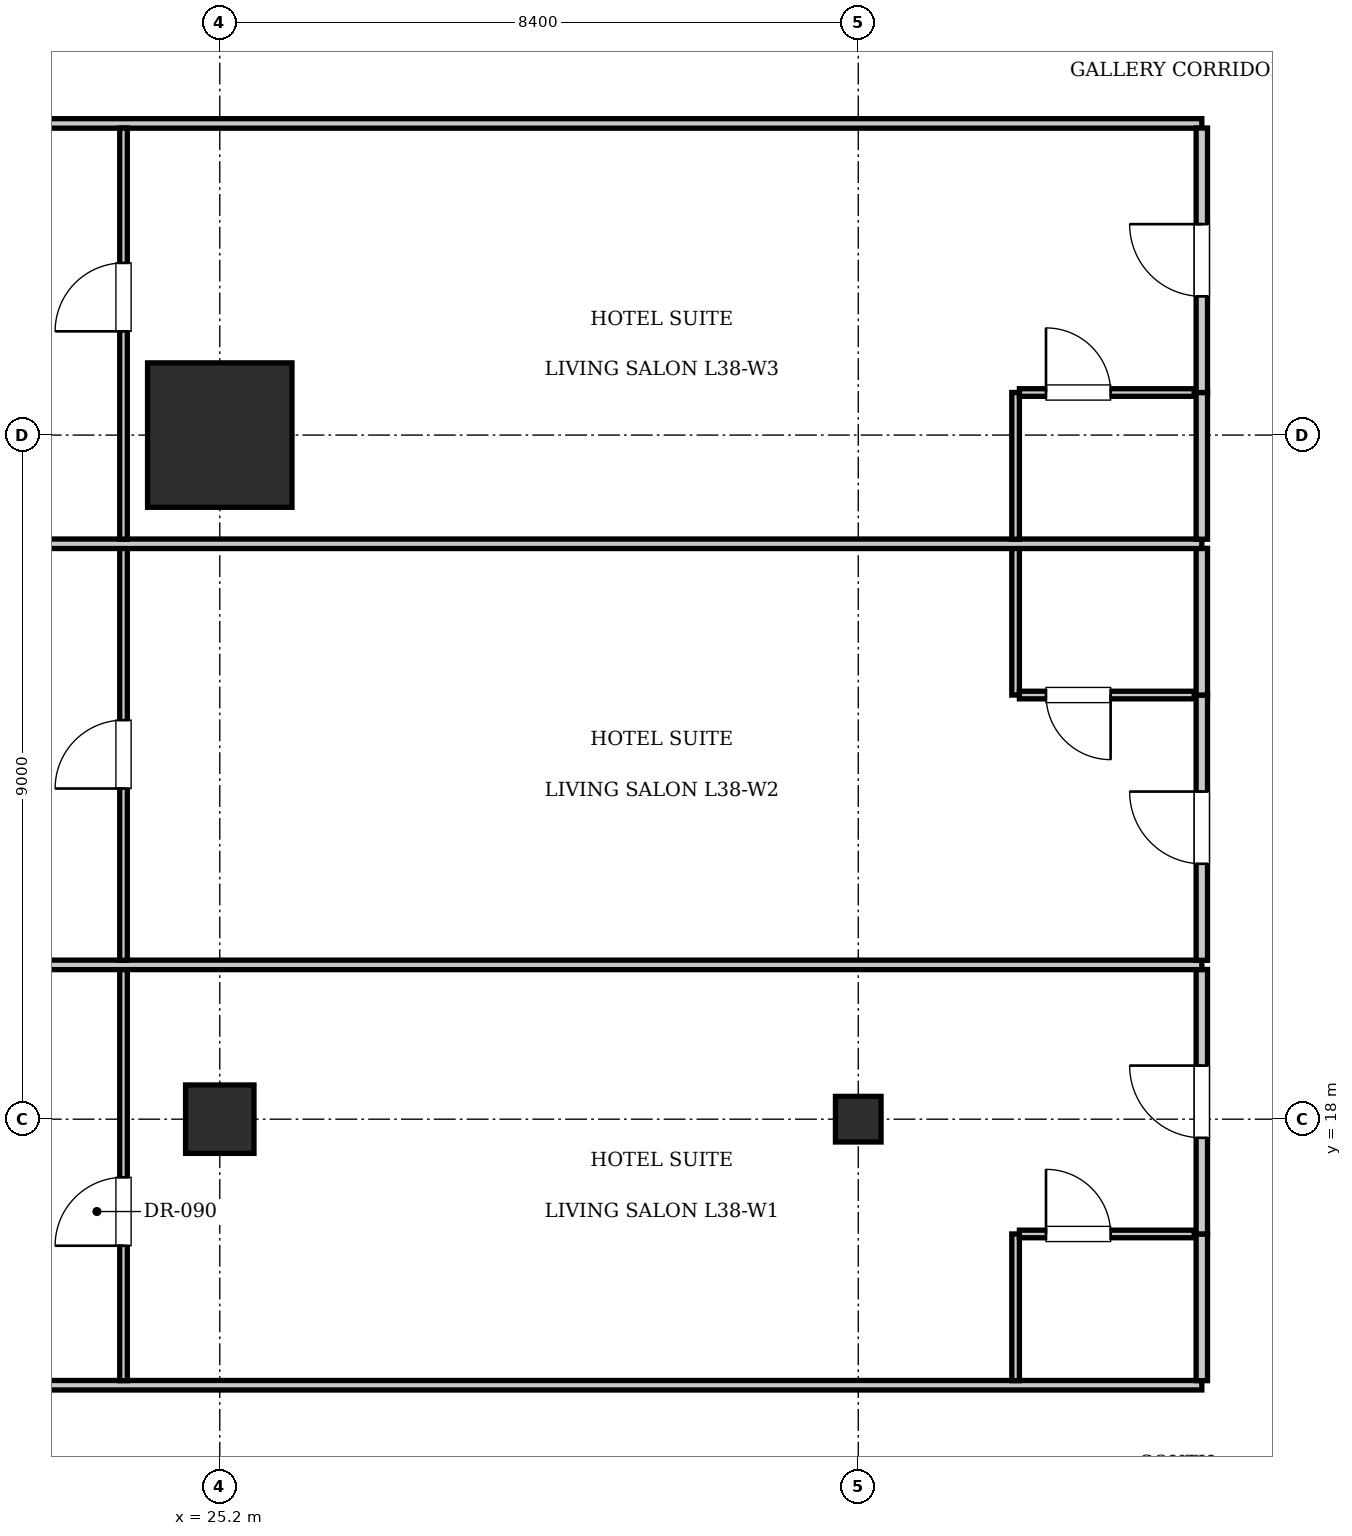
"""IFC4 building model, lengths in metres.
Left out: names, types, materials, properties, quantities, classifications, styles, units other than length and angle.
Written with IfcOpenShell. Run it as: python <this file> out.ifc"""

import sys

from ifc_helpers import new_model, si_unit, direction, frame, frame_2d, origin, origin_2d, place, context, subcontext, project, spatial, rectangle, i_section, extrude, element, fill, save


model = new_model("IFC4")
c1 = context("Model", 3, precision=1e-05, world=origin(), true_north=direction((0.0, 1.0)))
c2 = subcontext(c1, "Body", "Model", "MODEL_VIEW")
j1 = project(units=[si_unit("LENGTHUNIT", "METRE"), si_unit("PLANEANGLEUNIT", "RADIAN")], contexts=[c1])
p1 = place(None, origin())
s1 = spatial("IfcSite", under=j1, at=p1, CompositionType="ELEMENT")
p2 = place(p1, origin())
s2 = spatial("IfcBuilding", under=s1, at=p2, CompositionType="ELEMENT")
p3 = place(p2, frame((0.0, 0.0, 158.2)))
s3 = spatial("IfcBuildingStorey", under=s2, at=p3, CompositionType="ELEMENT", Elevation=158.2)
p4 = place(p3, frame((25.2, 27.0, 0.0), z_axis=(0.0, 0.0, 1.0), x_axis=(1.0, 0.0, 0.0)))
e1 = element("IfcColumn", 1, at=p4, inside=s3, PredefinedType="COLUMN", context=c2, shape_type="SweptSolid", body=[
    extrude(rectangle(XDim=1.9, YDim=1.9, at=origin_2d()), origin(), (0.0, 0.0, 1.0), 3.85),
])
p5 = place(p3, frame((25.2, 18.0, 0.0), z_axis=(0.0, 0.0, 1.0), x_axis=(1.0, 0.0, 0.0)))
e2 = element("IfcColumn", 2, at=p5, inside=s3, PredefinedType="COLUMN", context=c2, shape_type="SweptSolid", body=[
    extrude(rectangle(XDim=0.9, YDim=0.9, at=origin_2d()), origin(), (0.0, 0.0, 1.0), 3.85),
])
p6 = place(p3, frame((33.6, 18.0, 0.0), z_axis=(0.0, 0.0, 1.0), x_axis=(1.0, 0.0, 0.0)))
e3 = element("IfcColumn", 3, at=p6, inside=s3, PredefinedType="COLUMN", context=c2, shape_type="SweptSolid", body=[
    extrude(i_section(OverallWidth=0.6, OverallDepth=0.6, WebThickness=0.025, FlangeThickness=0.038, at=origin_2d()), origin(), (0.0, 0.0, 1.0), 3.85),
])
for number, where, z_axis, x_axis in (
    (4, (13.2, 14.5, 0.0), (0.0, 0.0, 1.0), (1.0, 0.0, 0.0)),
    (5, (13.2, 31.1, 0.0), (0.0, 0.0, 1.0), (1.0, 0.0, 0.0)),
):
    element("IfcWall", number, at=place(p3, frame(where, z_axis=z_axis, x_axis=x_axis)), inside=s3, PredefinedType="PARTITIONING", context=c2, shape_type="SweptSolid", body=[
        extrude(rectangle(XDim=24.92, YDim=0.125, at=frame_2d((12.46, 0.0))), origin(), (0.0, 0.0, 1.0), 3.61),
    ])
p7 = place(p3, frame((38.12, 14.56, 0.0), z_axis=(0.0, 0.0, 1.0), x_axis=(0.0, 1.0, 0.0)))
e6 = element("IfcWall", 6, at=p7, inside=s3, PredefinedType="PARTITIONING", context=c2, shape_type="SweptSolid", body=[
    extrude(rectangle(XDim=1.93, YDim=0.15, at=frame_2d((0.965, 0.0))), origin(), (0.0, 0.0, 1.0), 3.61),
])
p8 = place(p3, frame((38.12, 16.49, 0.0), z_axis=(0.0, 0.0, 1.0), x_axis=(0.0, 1.0, 0.0)))
e7 = element("IfcWall", 7, at=p8, inside=s3, PredefinedType="PARTITIONING", context=c2, shape_type="SweptSolid", body=[
    extrude(rectangle(XDim=3.48, YDim=0.15, at=frame_2d((1.74, 0.0))), origin(), (0.0, 0.0, 1.0), 3.61),
])
p9 = place(p8, frame((1.265, 0.0, 0.0)))
e8 = element("IfcOpeningElement", 8, at=p9, cuts=e7, PredefinedType="OPENING", context=c2, shape_type="SweptSolid", body=[
    extrude(rectangle(XDim=0.95, YDim=2.15, at=frame_2d((0.475, 1.075))), frame((0.0, 0.085, 0.0), z_axis=(0.0, -1.0, 0.0), x_axis=(1.0, 0.0, 0.0)), (0.0, 0.0, 1.0), 0.17),
])
p10 = place(p3, frame((35.67, 14.56, 0.0), z_axis=(0.0, 0.0, 1.0), x_axis=(0.0, 1.0, 0.0)))
e9 = element("IfcWall", 9, at=p10, inside=s3, PredefinedType="PARTITIONING", context=c2, shape_type="SweptSolid", body=[
    extrude(rectangle(XDim=1.93, YDim=0.1, at=frame_2d((0.965, 0.0))), origin(), (0.0, 0.0, 1.0), 3.61),
])
p11 = place(p3, frame((35.72, 16.49, 0.0), z_axis=(0.0, 0.0, 1.0), x_axis=(1.0, 0.0, 0.0)))
e10 = element("IfcWall", 10, at=p11, inside=s3, PredefinedType="PARTITIONING", context=c2, shape_type="SweptSolid", body=[
    extrude(rectangle(XDim=2.3, YDim=0.1, at=frame_2d((1.15, 0.0))), origin(), (0.0, 0.0, 1.0), 3.61),
])
p12 = place(p11, frame((0.35, 0.0, 0.0)))
e11 = element("IfcOpeningElement", 11, at=p12, cuts=e10, PredefinedType="OPENING", context=c2, shape_type="SweptSolid", body=[
    extrude(rectangle(XDim=0.85, YDim=2.1, at=frame_2d((0.425, 1.05))), frame((0.0, 0.06, 0.0), z_axis=(0.0, -1.0, 0.0), x_axis=(1.0, 0.0, 0.0)), (0.0, 0.0, 1.0), 0.12),
])
p13 = place(p3, frame((23.934, 14.56, 0.0), z_axis=(0.0, 0.0, 1.0), x_axis=(0.0, 1.0, 0.0)))
e12 = element("IfcWall", 12, at=p13, inside=s3, PredefinedType="PARTITIONING", context=c2, shape_type="SweptSolid", body=[
    extrude(rectangle(XDim=5.41, YDim=0.1, at=frame_2d((2.705, 0.0))), origin(), (0.0, 0.0, 1.0), 3.61),
])
p14 = place(p13, frame((1.775, 0.0, 0.0)))
e13 = element("IfcOpeningElement", 13, at=p14, cuts=e12, PredefinedType="OPENING", context=c2, shape_type="SweptSolid", body=[
    extrude(rectangle(XDim=0.9, YDim=2.1, at=frame_2d((0.45, 1.05))), frame((0.0, 0.06, 0.0), z_axis=(0.0, -1.0, 0.0), x_axis=(1.0, 0.0, 0.0)), (0.0, 0.0, 1.0), 0.12),
])
p15 = place(p3, frame((13.2, 20.03, 0.0), z_axis=(0.0, 0.0, 1.0), x_axis=(1.0, 0.0, 0.0)))
e14 = element("IfcWall", 14, at=p15, inside=s3, PredefinedType="PARTITIONING", context=c2, shape_type="SweptSolid", body=[
    extrude(rectangle(XDim=24.92, YDim=0.125, at=frame_2d((12.46, 0.0))), origin(), (0.0, 0.0, 1.0), 3.61),
])
p16 = place(p3, frame((38.12, 20.09, 0.0), z_axis=(0.0, 0.0, 1.0), x_axis=(0.0, 1.0, 0.0)))
e15 = element("IfcWall", 15, at=p16, inside=s3, PredefinedType="PARTITIONING", context=c2, shape_type="SweptSolid", body=[
    extrude(rectangle(XDim=3.49, YDim=0.15, at=frame_2d((1.745, 0.0))), origin(), (0.0, 0.0, 1.0), 3.61),
])
p17 = place(p16, frame((1.27, 0.0, 0.0)))
e16 = element("IfcOpeningElement", 16, at=p17, cuts=e15, PredefinedType="OPENING", context=c2, shape_type="SweptSolid", body=[
    extrude(rectangle(XDim=0.95, YDim=2.15, at=frame_2d((0.475, 1.075))), frame((0.0, 0.085, 0.0), z_axis=(0.0, -1.0, 0.0), x_axis=(1.0, 0.0, 0.0)), (0.0, 0.0, 1.0), 0.17),
])
p18 = place(p3, frame((38.12, 23.58, 0.0), z_axis=(0.0, 0.0, 1.0), x_axis=(0.0, 1.0, 0.0)))
e17 = element("IfcWall", 17, at=p18, inside=s3, PredefinedType="PARTITIONING", context=c2, shape_type="SweptSolid", body=[
    extrude(rectangle(XDim=1.93, YDim=0.15, at=frame_2d((0.965, 0.0))), origin(), (0.0, 0.0, 1.0), 3.61),
])
p19 = place(p3, frame((35.67, 23.58, 0.0), z_axis=(0.0, 0.0, 1.0), x_axis=(0.0, 1.0, 0.0)))
e18 = element("IfcWall", 18, at=p19, inside=s3, PredefinedType="PARTITIONING", context=c2, shape_type="SweptSolid", body=[
    extrude(rectangle(XDim=1.93, YDim=0.1, at=frame_2d((0.965, 0.0))), origin(), (0.0, 0.0, 1.0), 3.61),
])
p20 = place(p3, frame((35.72, 23.58, 0.0), z_axis=(0.0, 0.0, 1.0), x_axis=(1.0, 0.0, 0.0)))
e19 = element("IfcWall", 19, at=p20, inside=s3, PredefinedType="PARTITIONING", context=c2, shape_type="SweptSolid", body=[
    extrude(rectangle(XDim=2.3, YDim=0.1, at=frame_2d((1.15, 0.0))), origin(), (0.0, 0.0, 1.0), 3.61),
])
p21 = place(p20, frame((0.35, 0.0, 0.0)))
e20 = element("IfcOpeningElement", 20, at=p21, cuts=e19, PredefinedType="OPENING", context=c2, shape_type="SweptSolid", body=[
    extrude(rectangle(XDim=0.85, YDim=2.1, at=frame_2d((0.425, 1.05))), frame((0.0, 0.06, 0.0), z_axis=(0.0, -1.0, 0.0), x_axis=(1.0, 0.0, 0.0)), (0.0, 0.0, 1.0), 0.12),
])
p22 = place(p3, frame((23.934, 20.09, 0.0), z_axis=(0.0, 0.0, 1.0), x_axis=(0.0, 1.0, 0.0)))
e21 = element("IfcWall", 21, at=p22, inside=s3, PredefinedType="PARTITIONING", context=c2, shape_type="SweptSolid", body=[
    extrude(rectangle(XDim=5.42, YDim=0.1, at=frame_2d((2.71, 0.0))), origin(), (0.0, 0.0, 1.0), 3.61),
])
p23 = place(p22, frame((2.26, 0.0, 0.0)))
e22 = element("IfcOpeningElement", 22, at=p23, cuts=e21, PredefinedType="OPENING", context=c2, shape_type="SweptSolid", body=[
    extrude(rectangle(XDim=0.9, YDim=2.1, at=frame_2d((0.45, 1.05))), frame((0.0, 0.06, 0.0), z_axis=(0.0, -1.0, 0.0), x_axis=(1.0, 0.0, 0.0)), (0.0, 0.0, 1.0), 0.12),
])
p24 = place(p3, frame((13.2, 25.57, 0.0), z_axis=(0.0, 0.0, 1.0), x_axis=(1.0, 0.0, 0.0)))
e23 = element("IfcWall", 23, at=p24, inside=s3, PredefinedType="PARTITIONING", context=c2, shape_type="SweptSolid", body=[
    extrude(rectangle(XDim=24.92, YDim=0.125, at=frame_2d((12.46, 0.0))), origin(), (0.0, 0.0, 1.0), 3.61),
])
p25 = place(p3, frame((38.12, 25.63, 0.0), z_axis=(0.0, 0.0, 1.0), x_axis=(0.0, 1.0, 0.0)))
e24 = element("IfcWall", 24, at=p25, inside=s3, PredefinedType="PARTITIONING", context=c2, shape_type="SweptSolid", body=[
    extrude(rectangle(XDim=1.93, YDim=0.15, at=frame_2d((0.965, 0.0))), origin(), (0.0, 0.0, 1.0), 3.61),
])
p26 = place(p3, frame((38.12, 27.56, 0.0), z_axis=(0.0, 0.0, 1.0), x_axis=(0.0, 1.0, 0.0)))
e25 = element("IfcWall", 25, at=p26, inside=s3, PredefinedType="PARTITIONING", context=c2, shape_type="SweptSolid", body=[
    extrude(rectangle(XDim=3.48, YDim=0.15, at=frame_2d((1.74, 0.0))), origin(), (0.0, 0.0, 1.0), 3.61),
])
p27 = place(p26, frame((1.265, 0.0, 0.0)))
e26 = element("IfcOpeningElement", 26, at=p27, cuts=e25, PredefinedType="OPENING", context=c2, shape_type="SweptSolid", body=[
    extrude(rectangle(XDim=0.95, YDim=2.15, at=frame_2d((0.475, 1.075))), frame((0.0, 0.085, 0.0), z_axis=(0.0, -1.0, 0.0), x_axis=(1.0, 0.0, 0.0)), (0.0, 0.0, 1.0), 0.17),
])
p28 = place(p3, frame((35.67, 25.63, 0.0), z_axis=(0.0, 0.0, 1.0), x_axis=(0.0, 1.0, 0.0)))
e27 = element("IfcWall", 27, at=p28, inside=s3, PredefinedType="PARTITIONING", context=c2, shape_type="SweptSolid", body=[
    extrude(rectangle(XDim=1.93, YDim=0.1, at=frame_2d((0.965, 0.0))), origin(), (0.0, 0.0, 1.0), 3.61),
])
p29 = place(p3, frame((35.72, 27.56, 0.0), z_axis=(0.0, 0.0, 1.0), x_axis=(1.0, 0.0, 0.0)))
e28 = element("IfcWall", 28, at=p29, inside=s3, PredefinedType="PARTITIONING", context=c2, shape_type="SweptSolid", body=[
    extrude(rectangle(XDim=2.3, YDim=0.1, at=frame_2d((1.15, 0.0))), origin(), (0.0, 0.0, 1.0), 3.61),
])
p30 = place(p29, frame((0.35, 0.0, 0.0)))
e29 = element("IfcOpeningElement", 29, at=p30, cuts=e28, PredefinedType="OPENING", context=c2, shape_type="SweptSolid", body=[
    extrude(rectangle(XDim=0.85, YDim=2.1, at=frame_2d((0.425, 1.05))), frame((0.0, 0.06, 0.0), z_axis=(0.0, -1.0, 0.0), x_axis=(1.0, 0.0, 0.0)), (0.0, 0.0, 1.0), 0.12),
])
p31 = place(p3, frame((23.934, 25.63, 0.0), z_axis=(0.0, 0.0, 1.0), x_axis=(0.0, 1.0, 0.0)))
e30 = element("IfcWall", 30, at=p31, inside=s3, PredefinedType="PARTITIONING", context=c2, shape_type="SweptSolid", body=[
    extrude(rectangle(XDim=5.41, YDim=0.1, at=frame_2d((2.705, 0.0))), origin(), (0.0, 0.0, 1.0), 3.61),
])
p32 = place(p31, frame((2.735, 0.0, 0.0)))
e31 = element("IfcOpeningElement", 31, at=p32, cuts=e30, PredefinedType="OPENING", context=c2, shape_type="SweptSolid", body=[
    extrude(rectangle(XDim=0.9, YDim=2.1, at=frame_2d((0.45, 1.05))), frame((0.0, 0.06, 0.0), z_axis=(0.0, -1.0, 0.0), x_axis=(1.0, 0.0, 0.0)), (0.0, 0.0, 1.0), 0.12),
])
p33 = place(p12, origin())
e32 = element("IfcDoor", 32, at=p33, inside=s3, OperationType="SINGLE_SWING_LEFT", PredefinedType="DOOR", context=c2, shape_type="SweptSolid", body=[
    extrude(rectangle(XDim=0.85, YDim=2.1, at=frame_2d((0.425, 1.05))), frame((0.0, 0.025, 0.0), z_axis=(0.0, -1.0, 0.0), x_axis=(1.0, 0.0, 0.0)), (0.0, 0.0, 1.0), 0.05),
])
fill(e11, e32)
p34 = place(p9, origin())
e33 = element("IfcDoor", 33, at=p34, inside=s3, OperationType="SINGLE_SWING_RIGHT", PredefinedType="DOOR", context=c2, shape_type="SweptSolid", body=[
    extrude(rectangle(XDim=0.95, YDim=2.15, at=frame_2d((0.475, 1.075))), frame((0.0, 0.025, 0.0), z_axis=(0.0, -1.0, 0.0), x_axis=(1.0, 0.0, 0.0)), (0.0, 0.0, 1.0), 0.05),
])
fill(e8, e33)
p35 = place(p14, origin())
e34 = element("IfcDoor", 34, at=p35, inside=s3, OperationType="SINGLE_SWING_LEFT", PredefinedType="DOOR", context=c2, shape_type="SweptSolid", body=[
    extrude(rectangle(XDim=0.9, YDim=2.1, at=frame_2d((0.45, 1.05))), frame((0.0, 0.025, 0.0), z_axis=(0.0, -1.0, 0.0), x_axis=(1.0, 0.0, 0.0)), (0.0, 0.0, 1.0), 0.05),
])
fill(e13, e34)
p36 = place(p21, frame((0.85, 0.0, 0.0), z_axis=(0.0, 0.0, 1.0), x_axis=(-1.0, 0.0, 0.0)))
e35 = element("IfcDoor", 35, at=p36, inside=s3, OperationType="SINGLE_SWING_LEFT", PredefinedType="DOOR", context=c2, shape_type="SweptSolid", body=[
    extrude(rectangle(XDim=0.85, YDim=2.1, at=frame_2d((0.425, 1.05))), frame((0.0, 0.025, 0.0), z_axis=(0.0, -1.0, 0.0), x_axis=(1.0, 0.0, 0.0)), (0.0, 0.0, 1.0), 0.05),
])
fill(e20, e35)
p37 = place(p17, origin())
e36 = element("IfcDoor", 36, at=p37, inside=s3, OperationType="SINGLE_SWING_RIGHT", PredefinedType="DOOR", context=c2, shape_type="SweptSolid", body=[
    extrude(rectangle(XDim=0.95, YDim=2.15, at=frame_2d((0.475, 1.075))), frame((0.0, 0.025, 0.0), z_axis=(0.0, -1.0, 0.0), x_axis=(1.0, 0.0, 0.0)), (0.0, 0.0, 1.0), 0.05),
])
fill(e16, e36)
p38 = place(p23, origin())
e37 = element("IfcDoor", 37, at=p38, inside=s3, OperationType="SINGLE_SWING_LEFT", PredefinedType="DOOR", context=c2, shape_type="SweptSolid", body=[
    extrude(rectangle(XDim=0.9, YDim=2.1, at=frame_2d((0.45, 1.05))), frame((0.0, 0.025, 0.0), z_axis=(0.0, -1.0, 0.0), x_axis=(1.0, 0.0, 0.0)), (0.0, 0.0, 1.0), 0.05),
])
fill(e22, e37)
p39 = place(p30, origin())
e38 = element("IfcDoor", 38, at=p39, inside=s3, OperationType="SINGLE_SWING_LEFT", PredefinedType="DOOR", context=c2, shape_type="SweptSolid", body=[
    extrude(rectangle(XDim=0.85, YDim=2.1, at=frame_2d((0.425, 1.05))), frame((0.0, 0.025, 0.0), z_axis=(0.0, -1.0, 0.0), x_axis=(1.0, 0.0, 0.0)), (0.0, 0.0, 1.0), 0.05),
])
fill(e29, e38)
p40 = place(p27, origin())
e39 = element("IfcDoor", 39, at=p40, inside=s3, OperationType="SINGLE_SWING_RIGHT", PredefinedType="DOOR", context=c2, shape_type="SweptSolid", body=[
    extrude(rectangle(XDim=0.95, YDim=2.15, at=frame_2d((0.475, 1.075))), frame((0.0, 0.025, 0.0), z_axis=(0.0, -1.0, 0.0), x_axis=(1.0, 0.0, 0.0)), (0.0, 0.0, 1.0), 0.05),
])
fill(e26, e39)
p41 = place(p32, origin())
e40 = element("IfcDoor", 40, at=p41, inside=s3, OperationType="SINGLE_SWING_LEFT", PredefinedType="DOOR", context=c2, shape_type="SweptSolid", body=[
    extrude(rectangle(XDim=0.9, YDim=2.1, at=frame_2d((0.45, 1.05))), frame((0.0, 0.025, 0.0), z_axis=(0.0, -1.0, 0.0), x_axis=(1.0, 0.0, 0.0)), (0.0, 0.0, 1.0), 0.05),
])
fill(e31, e40)
save(model, sys.argv[1])
